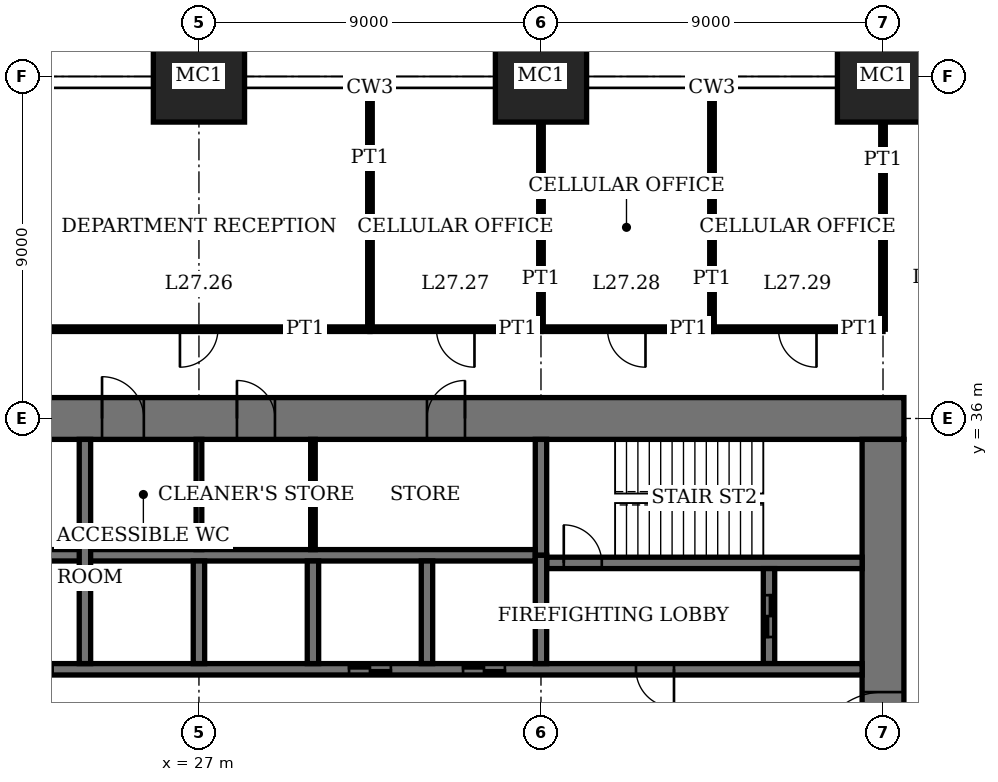
"""IFC4 building model, lengths in metres.
Left out: names, types, materials, properties, quantities, classifications, styles, units other than length and angle.
Written with IfcOpenShell. Run it as: python <this file> out.ifc"""

import sys

from ifc_helpers import new_model, si_unit, direction, frame, frame_2d, origin, origin_2d, place, context, subcontext, project, spatial, rectangle, extrude, element, fill, save


model = new_model("IFC4")
c1 = context("Model", 3, precision=1e-05, world=origin(), true_north=direction((0.0, 1.0)))
c2 = subcontext(c1, "Body", "Model", "MODEL_VIEW")
j1 = project(units=[si_unit("LENGTHUNIT", "METRE"), si_unit("PLANEANGLEUNIT", "RADIAN")], contexts=[c1])
p1 = place(None, origin())
s1 = spatial("IfcSite", under=j1, at=p1, CompositionType="ELEMENT")
p2 = place(p1, origin())
s2 = spatial("IfcBuilding", under=s1, at=p2, CompositionType="ELEMENT")
p3 = place(p2, frame((0.0, 0.0, 113.0)))
s3 = spatial("IfcBuildingStorey", under=s2, at=p3, CompositionType="ELEMENT", Elevation=113.0)
for number, where, z_axis, x_axis in (
    (1, (27.0, 45.0, 0.0), (0.0, 0.0, 1.0), (1.0, 0.0, 0.0)),
    (2, (36.0, 45.0, 0.0), (0.0, 0.0, 1.0), (1.0, 0.0, 0.0)),
    (3, (45.0, 45.0, 0.0), (0.0, 0.0, 1.0), (1.0, 0.0, 0.0)),
):
    element("IfcColumn", number, at=place(p3, frame(where, z_axis=z_axis, x_axis=x_axis)), inside=s3, PredefinedType="COLUMN", context=c2, shape_type="SweptSolid", body=[
        extrude(rectangle(XDim=2.4, YDim=2.4, at=origin_2d()), origin(), (0.0, 0.0, 1.0), 4.0),
    ])
p4 = place(p3, frame((45.55, 36.0, 0.0), z_axis=(0.0, 0.0, 1.0), x_axis=(-1.0, 0.0, 0.0)))
e4 = element("IfcWall", 4, at=p4, inside=s3, PredefinedType="SHEAR", context=c2, shape_type="SweptSolid", body=[
    extrude(rectangle(XDim=28.1, YDim=1.1, at=frame_2d((14.05, 0.0))), origin(), (0.0, 0.0, 1.0), 4.0),
])
p5 = place(p4, frame((11.55, 0.0, 0.0)))
e5 = element("IfcOpeningElement", 5, at=p5, cuts=e4, PredefinedType="OPENING", context=c2, shape_type="SweptSolid", body=[
    extrude(rectangle(XDim=1.0, YDim=2.4, at=frame_2d((0.5, 1.2))), frame((0.0, 0.56, 0.0), z_axis=(0.0, -1.0, 0.0), x_axis=(1.0, 0.0, 0.0)), (0.0, 0.0, 1.0), 1.12),
])
p6 = place(p4, frame((16.55, 0.0, 0.0)))
e6 = element("IfcOpeningElement", 6, at=p6, cuts=e4, PredefinedType="OPENING", context=c2, shape_type="SweptSolid", body=[
    extrude(rectangle(XDim=1.0, YDim=2.4, at=frame_2d((0.5, 1.2))), frame((0.0, 0.56, 0.0), z_axis=(0.0, -1.0, 0.0), x_axis=(1.0, 0.0, 0.0)), (0.0, 0.0, 1.0), 1.12),
])
p7 = place(p4, frame((20.0, 0.0, 0.0)))
e7 = element("IfcOpeningElement", 7, at=p7, cuts=e4, PredefinedType="OPENING", context=c2, shape_type="SweptSolid", body=[
    extrude(rectangle(XDim=1.1, YDim=2.4, at=frame_2d((0.55, 1.2))), frame((0.0, 0.56, 0.0), z_axis=(0.0, -1.0, 0.0), x_axis=(1.0, 0.0, 0.0)), (0.0, 0.0, 1.0), 1.12),
])
p8 = place(p4, frame((24.05, 0.0, 0.0)))
e8 = element("IfcOpeningElement", 8, at=p8, cuts=e4, PredefinedType="OPENING", context=c2, shape_type="SweptSolid", body=[
    extrude(rectangle(XDim=1.0, YDim=2.4, at=frame_2d((0.5, 1.2))), frame((0.0, 0.56, 0.0), z_axis=(0.0, -1.0, 0.0), x_axis=(1.0, 0.0, 0.0)), (0.0, 0.0, 1.0), 1.12),
])
p9 = place(p3, frame((45.0, 18.55, 0.0), z_axis=(0.0, 0.0, 1.0), x_axis=(0.0, 1.0, 0.0)))
e9 = element("IfcWall", 9, at=p9, inside=s3, PredefinedType="SHEAR", context=c2, shape_type="SweptSolid", body=[
    extrude(rectangle(XDim=16.9, YDim=1.1, at=frame_2d((8.45, 0.0))), origin(), (0.0, 0.0, 1.0), 4.0),
])
p10 = place(p9, frame((8.45, 0.0, 0.0)))
e10 = element("IfcOpeningElement", 10, at=p10, cuts=e9, PredefinedType="OPENING", context=c2, shape_type="SweptSolid", body=[
    extrude(rectangle(XDim=1.8, YDim=2.4, at=frame_2d((0.9, 1.2))), frame((0.0, 0.56, 0.0), z_axis=(0.0, -1.0, 0.0), x_axis=(1.0, 0.0, 0.0)), (0.0, 0.0, 1.0), 1.12),
])
p11 = place(p3, frame((36.15, 32.2, 0.0), z_axis=(0.0, 0.0, 1.0), x_axis=(1.0, 0.0, 0.0)))
e11 = element("IfcWall", 11, at=p11, inside=s3, PredefinedType="SHEAR", context=c2, shape_type="SweptSolid", body=[
    extrude(rectangle(XDim=8.3, YDim=0.3, at=frame_2d((4.15, 0.0))), origin(), (0.0, 0.0, 1.0), 4.0),
])
p12 = place(p11, frame((0.45, 0.0, 0.0)))
e12 = element("IfcOpeningElement", 12, at=p12, cuts=e11, PredefinedType="OPENING", context=c2, shape_type="SweptSolid", body=[
    extrude(rectangle(XDim=1.0, YDim=2.4, at=frame_2d((0.5, 1.2))), frame((0.0, 0.16, 0.0), z_axis=(0.0, -1.0, 0.0), x_axis=(1.0, 0.0, 0.0)), (0.0, 0.0, 1.0), 0.32),
])
p13 = place(p3, frame((36.0, 32.4, 0.0), z_axis=(0.0, 0.0, 1.0), x_axis=(0.0, 1.0, 0.0)))
e13 = element("IfcWall", 13, at=p13, inside=s3, PredefinedType="SHEAR", context=c2, shape_type="SweptSolid", body=[
    extrude(rectangle(XDim=3.05, YDim=0.3, at=frame_2d((1.525, 0.0))), origin(), (0.0, 0.0, 1.0), 4.0),
])
p14 = place(p3, frame((42.0, 29.55, 0.0), z_axis=(0.0, 0.0, 1.0), x_axis=(0.0, 1.0, 0.0)))
e14 = element("IfcWall", 14, at=p14, inside=s3, PredefinedType="SHEAR", context=c2, shape_type="SweptSolid", body=[
    extrude(rectangle(XDim=2.5, YDim=0.3, at=frame_2d((1.25, 0.0))), origin(), (0.0, 0.0, 1.0), 4.0),
])
p15 = place(p14, frame((0.7, 0.0, 0.0)))
e15 = element("IfcOpeningElement", 15, at=p15, cuts=e14, PredefinedType="OPENING", context=c2, shape_type="SweptSolid", body=[
    extrude(rectangle(XDim=1.1, YDim=2.4, at=frame_2d((0.55, 1.2))), frame((0.0, 0.16, 0.0), z_axis=(0.0, -1.0, 0.0), x_axis=(1.0, 0.0, 0.0)), (0.0, 0.0, 1.0), 0.32),
])
p16 = place(p3, frame((18.55, 29.4, 0.0), z_axis=(0.0, 0.0, 1.0), x_axis=(1.0, 0.0, 0.0)))
e16 = element("IfcWall", 16, at=p16, inside=s3, PredefinedType="SHEAR", context=c2, shape_type="SweptSolid", body=[
    extrude(rectangle(XDim=25.9, YDim=0.3, at=frame_2d((12.95, 0.0))), origin(), (0.0, 0.0, 1.0), 4.0),
])
p17 = place(p16, frame((19.95, 0.0, 0.0)))
e17 = element("IfcOpeningElement", 17, at=p17, cuts=e16, PredefinedType="OPENING", context=c2, shape_type="SweptSolid", body=[
    extrude(rectangle(XDim=1.0, YDim=2.4, at=frame_2d((0.5, 1.2))), frame((0.0, 0.16, 0.0), z_axis=(0.0, -1.0, 0.0), x_axis=(1.0, 0.0, 0.0)), (0.0, 0.0, 1.0), 0.32),
])
p18 = place(p16, frame((0.5, 0.0, 0.0)))
e18 = element("IfcOpeningElement", 18, at=p18, cuts=e16, PredefinedType="OPENING", context=c2, shape_type="SweptSolid", body=[
    extrude(rectangle(XDim=0.9, YDim=2.1, at=frame_2d((0.45, 1.05))), frame((0.0, 0.16, 0.0), z_axis=(0.0, -1.0, 0.0), x_axis=(1.0, 0.0, 0.0)), (0.0, 0.0, 1.0), 0.32),
])
p19 = place(p16, frame((15.4, 0.0, 0.0)))
e19 = element("IfcOpeningElement", 19, at=p19, cuts=e16, PredefinedType="OPENING", context=c2, shape_type="SweptSolid", body=[
    extrude(rectangle(XDim=1.1, YDim=2.4, at=frame_2d((0.55, 1.2))), frame((0.0, 0.16, 0.0), z_axis=(0.0, -1.0, 0.0), x_axis=(1.0, 0.0, 0.0)), (0.0, 0.0, 1.0), 0.32),
])
p20 = place(p16, frame((12.4, 0.0, 0.0)))
e20 = element("IfcOpeningElement", 20, at=p20, cuts=e16, PredefinedType="OPENING", context=c2, shape_type="SweptSolid", body=[
    extrude(rectangle(XDim=1.1, YDim=2.4, at=frame_2d((0.55, 1.2))), frame((0.0, 0.16, 0.0), z_axis=(0.0, -1.0, 0.0), x_axis=(1.0, 0.0, 0.0)), (0.0, 0.0, 1.0), 0.32),
])
p21 = place(p16, frame((3.3, 0.0, 0.0)))
e21 = element("IfcOpeningElement", 21, at=p21, cuts=e16, PredefinedType="OPENING", context=c2, shape_type="SweptSolid", body=[
    extrude(rectangle(XDim=1.3, YDim=2.4, at=frame_2d((0.65, 1.2))), frame((0.0, 0.16, 0.0), z_axis=(0.0, -1.0, 0.0), x_axis=(1.0, 0.0, 0.0)), (0.0, 0.0, 1.0), 0.32),
])
p22 = place(p3, frame((18.55, 32.4, 0.0), z_axis=(0.0, 0.0, 1.0), x_axis=(1.0, 0.0, 0.0)))
e22 = element("IfcWall", 22, at=p22, inside=s3, PredefinedType="SHEAR", context=c2, shape_type="SweptSolid", body=[
    extrude(rectangle(XDim=17.3, YDim=0.3, at=frame_2d((8.65, 0.0))), origin(), (0.0, 0.0, 1.0), 4.0),
])
for number, where, z_axis, x_axis in (
    (23, (33.0, 29.55, 0.0), (0.0, 0.0, 1.0), (0.0, 1.0, 0.0)),
    (24, (30.0, 29.55, 0.0), (0.0, 0.0, 1.0), (0.0, 1.0, 0.0)),
    (25, (27.0, 29.55, 0.0), (0.0, 0.0, 1.0), (0.0, 1.0, 0.0)),
):
    element("IfcWall", number, at=place(p3, frame(where, z_axis=z_axis, x_axis=x_axis)), inside=s3, PredefinedType="SHEAR", context=c2, shape_type="SweptSolid", body=[
        extrude(rectangle(XDim=2.7, YDim=0.3, at=frame_2d((1.35, 0.0))), origin(), (0.0, 0.0, 1.0), 4.0),
    ])
p23 = place(p3, frame((24.0, 29.55, 0.0), z_axis=(0.0, 0.0, 1.0), x_axis=(0.0, 1.0, 0.0)))
e26 = element("IfcWall", 26, at=p23, inside=s3, PredefinedType="SHEAR", context=c2, shape_type="SweptSolid", body=[
    extrude(rectangle(XDim=5.9, YDim=0.3, at=frame_2d((2.95, 0.0))), origin(), (0.0, 0.0, 1.0), 4.0),
])
p24 = place(p3, frame((36.0, 29.55, 0.0), z_axis=(0.0, 0.0, 1.0), x_axis=(0.0, 1.0, 0.0)))
e27 = element("IfcWall", 27, at=p24, inside=s3, PredefinedType="SHEAR", context=c2, shape_type="SweptSolid", body=[
    extrude(rectangle(XDim=2.85, YDim=0.3, at=frame_2d((1.425, 0.0))), origin(), (0.0, 0.0, 1.0), 4.0),
])
p25 = place(p3, frame((22.5, 38.35, 0.0), z_axis=(0.0, 0.0, 1.0), x_axis=(1.0, 0.0, 0.0)))
e28 = element("IfcWall", 28, at=p25, inside=s3, PredefinedType="PARTITIONING", context=c2, shape_type="SweptSolid", body=[
    extrude(rectangle(XDim=9.0, YDim=0.12, at=frame_2d((4.5, 0.0))), origin(), (0.0, 0.0, 1.0), 3.75),
])
p26 = place(p25, frame((4.0, 0.0, 0.0)))
e29 = element("IfcOpeningElement", 29, at=p26, cuts=e28, PredefinedType="OPENING", context=c2, shape_type="SweptSolid", body=[
    extrude(rectangle(XDim=1.0, YDim=2.4, at=frame_2d((0.5, 1.2))), frame((0.0, 0.07, 0.0), z_axis=(0.0, -1.0, 0.0), x_axis=(1.0, 0.0, 0.0)), (0.0, 0.0, 1.0), 0.14),
])
p27 = place(p3, frame((31.5, 38.35, 0.0), z_axis=(0.0, 0.0, 1.0), x_axis=(1.0, 0.0, 0.0)))
e30 = element("IfcWall", 30, at=p27, inside=s3, PredefinedType="PARTITIONING", context=c2, shape_type="SweptSolid", body=[
    extrude(rectangle(XDim=4.5, YDim=0.12, at=frame_2d((2.25, 0.0))), origin(), (0.0, 0.0, 1.0), 3.75),
])
p28 = place(p27, frame((1.75, 0.0, 0.0)))
e31 = element("IfcOpeningElement", 31, at=p28, cuts=e30, PredefinedType="OPENING", context=c2, shape_type="SweptSolid", body=[
    extrude(rectangle(XDim=1.0, YDim=2.4, at=frame_2d((0.5, 1.2))), frame((0.0, 0.07, 0.0), z_axis=(0.0, -1.0, 0.0), x_axis=(1.0, 0.0, 0.0)), (0.0, 0.0, 1.0), 0.14),
])
p29 = place(p3, frame((36.0, 38.35, 0.0), z_axis=(0.0, 0.0, 1.0), x_axis=(1.0, 0.0, 0.0)))
e32 = element("IfcWall", 32, at=p29, inside=s3, PredefinedType="PARTITIONING", context=c2, shape_type="SweptSolid", body=[
    extrude(rectangle(XDim=4.5, YDim=0.12, at=frame_2d((2.25, 0.0))), origin(), (0.0, 0.0, 1.0), 3.75),
])
p30 = place(p29, frame((1.75, 0.0, 0.0)))
e33 = element("IfcOpeningElement", 33, at=p30, cuts=e32, PredefinedType="OPENING", context=c2, shape_type="SweptSolid", body=[
    extrude(rectangle(XDim=1.0, YDim=2.4, at=frame_2d((0.5, 1.2))), frame((0.0, 0.07, 0.0), z_axis=(0.0, -1.0, 0.0), x_axis=(1.0, 0.0, 0.0)), (0.0, 0.0, 1.0), 0.14),
])
p31 = place(p3, frame((40.5, 38.35, 0.0), z_axis=(0.0, 0.0, 1.0), x_axis=(1.0, 0.0, 0.0)))
e34 = element("IfcWall", 34, at=p31, inside=s3, PredefinedType="PARTITIONING", context=c2, shape_type="SweptSolid", body=[
    extrude(rectangle(XDim=4.5, YDim=0.12, at=frame_2d((2.25, 0.0))), origin(), (0.0, 0.0, 1.0), 3.75),
])
p32 = place(p31, frame((1.75, 0.0, 0.0)))
e35 = element("IfcOpeningElement", 35, at=p32, cuts=e34, PredefinedType="OPENING", context=c2, shape_type="SweptSolid", body=[
    extrude(rectangle(XDim=1.0, YDim=2.4, at=frame_2d((0.5, 1.2))), frame((0.0, 0.07, 0.0), z_axis=(0.0, -1.0, 0.0), x_axis=(1.0, 0.0, 0.0)), (0.0, 0.0, 1.0), 0.14),
])
p33 = place(p3, frame((31.5, 38.35, 0.0), z_axis=(0.0, 0.0, 1.0), x_axis=(0.0, 1.0, 0.0)))
e36 = element("IfcWall", 36, at=p33, inside=s3, PredefinedType="PARTITIONING", context=c2, shape_type="SweptSolid", body=[
    extrude(rectangle(XDim=6.34, YDim=0.12, at=frame_2d((3.17, 0.0))), origin(), (0.0, 0.0, 1.0), 3.75),
])
p34 = place(p3, frame((36.0, 38.35, 0.0), z_axis=(0.0, 0.0, 1.0), x_axis=(0.0, 1.0, 0.0)))
e37 = element("IfcWall", 37, at=p34, inside=s3, PredefinedType="PARTITIONING", context=c2, shape_type="SweptSolid", body=[
    extrude(rectangle(XDim=5.45, YDim=0.12, at=frame_2d((2.725, 0.0))), origin(), (0.0, 0.0, 1.0), 3.05),
])
p35 = place(p3, frame((40.5, 38.35, 0.0), z_axis=(0.0, 0.0, 1.0), x_axis=(0.0, 1.0, 0.0)))
e38 = element("IfcWall", 38, at=p35, inside=s3, PredefinedType="PARTITIONING", context=c2, shape_type="SweptSolid", body=[
    extrude(rectangle(XDim=6.34, YDim=0.12, at=frame_2d((3.17, 0.0))), origin(), (0.0, 0.0, 1.0), 3.75),
])
p36 = place(p3, frame((45.0, 38.35, 0.0), z_axis=(0.0, 0.0, 1.0), x_axis=(0.0, 1.0, 0.0)))
e39 = element("IfcWall", 39, at=p36, inside=s3, PredefinedType="PARTITIONING", context=c2, shape_type="SweptSolid", body=[
    extrude(rectangle(XDim=5.45, YDim=0.12, at=frame_2d((2.725, 0.0))), origin(), (0.0, 0.0, 1.0), 3.05),
])
p37 = place(p3, frame((30.0, 32.55, 0.0), z_axis=(0.0, 0.0, 1.0), x_axis=(0.0, 1.0, 0.0)))
e40 = element("IfcWall", 40, at=p37, inside=s3, PredefinedType="PARTITIONING", context=c2, shape_type="SweptSolid", body=[
    extrude(rectangle(XDim=2.9, YDim=0.12, at=frame_2d((1.45, 0.0))), origin(), (0.0, 0.0, 1.0), 3.75),
])
p38 = place(p3, frame((27.0, 32.55, 0.0), z_axis=(0.0, 0.0, 1.0), x_axis=(0.0, 1.0, 0.0)))
e41 = element("IfcWall", 41, at=p38, inside=s3, PredefinedType="PARTITIONING", context=c2, shape_type="SweptSolid", body=[
    extrude(rectangle(XDim=2.9, YDim=0.15, at=frame_2d((1.45, 0.0))), origin(), (0.0, 0.0, 1.0), 3.75),
])
p39 = place(p10, origin())
e42 = element("IfcDoor", 42, at=p39, inside=s3, OperationType="DOUBLE_DOOR_DOUBLE_SWING", PredefinedType="DOOR", context=c2, shape_type="SweptSolid", body=[
    extrude(rectangle(XDim=1.8, YDim=2.4, at=frame_2d((0.9, 1.2))), frame((0.0, 0.03, 0.0), z_axis=(0.0, -1.0, 0.0), x_axis=(1.0, 0.0, 0.0)), (0.0, 0.0, 1.0), 0.06),
    extrude(rectangle(XDim=0.04, YDim=2.4, at=frame_2d((0.02, 1.2))), frame((0.0, 0.55, 0.0), z_axis=(0.0, -1.0, 0.0), x_axis=(1.0, 0.0, 0.0)), (0.0, 0.0, 1.0), 1.1),
    extrude(rectangle(XDim=0.04, YDim=2.4, at=frame_2d((1.78, 1.2))), frame((0.0, 0.55, 0.0), z_axis=(0.0, -1.0, 0.0), x_axis=(1.0, 0.0, 0.0)), (0.0, 0.0, 1.0), 1.1),
    extrude(rectangle(XDim=1.8, YDim=0.04, at=frame_2d((0.9, 2.38))), frame((0.0, 0.55, 0.0), z_axis=(0.0, -1.0, 0.0), x_axis=(1.0, 0.0, 0.0)), (0.0, 0.0, 1.0), 1.1),
])
fill(e10, e42)
p40 = place(p5, origin())
e43 = element("IfcDoor", 43, at=p40, inside=s3, OperationType="SINGLE_SWING_LEFT", PredefinedType="DOOR", context=c2, shape_type="SweptSolid", body=[
    extrude(rectangle(XDim=1.0, YDim=2.4, at=frame_2d((0.5, 1.2))), frame((0.0, 0.025, 0.0), z_axis=(0.0, -1.0, 0.0), x_axis=(1.0, 0.0, 0.0)), (0.0, 0.0, 1.0), 0.05),
    extrude(rectangle(XDim=0.04, YDim=2.4, at=frame_2d((0.02, 1.2))), frame((0.0, 0.4, 0.0), z_axis=(0.0, -1.0, 0.0), x_axis=(1.0, 0.0, 0.0)), (0.0, 0.0, 1.0), 0.8),
    extrude(rectangle(XDim=0.04, YDim=2.4, at=frame_2d((0.98, 1.2))), frame((0.0, 0.4, 0.0), z_axis=(0.0, -1.0, 0.0), x_axis=(1.0, 0.0, 0.0)), (0.0, 0.0, 1.0), 0.8),
    extrude(rectangle(XDim=1.0, YDim=0.04, at=frame_2d((0.5, 2.38))), frame((0.0, 0.4, 0.0), z_axis=(0.0, -1.0, 0.0), x_axis=(1.0, 0.0, 0.0)), (0.0, 0.0, 1.0), 0.8),
])
fill(e5, e43)
p41 = place(p6, origin())
e44 = element("IfcDoor", 44, at=p41, inside=s3, OperationType="SINGLE_SWING_RIGHT", PredefinedType="DOOR", context=c2, shape_type="SweptSolid", body=[
    extrude(rectangle(XDim=1.0, YDim=2.4, at=frame_2d((0.5, 1.2))), frame((0.0, 0.025, 0.0), z_axis=(0.0, -1.0, 0.0), x_axis=(1.0, 0.0, 0.0)), (0.0, 0.0, 1.0), 0.05),
    extrude(rectangle(XDim=0.04, YDim=2.4, at=frame_2d((0.02, 1.2))), frame((0.0, 0.4, 0.0), z_axis=(0.0, -1.0, 0.0), x_axis=(1.0, 0.0, 0.0)), (0.0, 0.0, 1.0), 0.8),
    extrude(rectangle(XDim=0.04, YDim=2.4, at=frame_2d((0.98, 1.2))), frame((0.0, 0.4, 0.0), z_axis=(0.0, -1.0, 0.0), x_axis=(1.0, 0.0, 0.0)), (0.0, 0.0, 1.0), 0.8),
    extrude(rectangle(XDim=1.0, YDim=0.04, at=frame_2d((0.5, 2.38))), frame((0.0, 0.4, 0.0), z_axis=(0.0, -1.0, 0.0), x_axis=(1.0, 0.0, 0.0)), (0.0, 0.0, 1.0), 0.8),
])
fill(e6, e44)
p42 = place(p7, origin())
e45 = element("IfcDoor", 45, at=p42, inside=s3, OperationType="SINGLE_SWING_RIGHT", PredefinedType="DOOR", context=c2, shape_type="SweptSolid", body=[
    extrude(rectangle(XDim=1.1, YDim=2.4, at=frame_2d((0.55, 1.2))), frame((0.0, 0.025, 0.0), z_axis=(0.0, -1.0, 0.0), x_axis=(1.0, 0.0, 0.0)), (0.0, 0.0, 1.0), 0.05),
    extrude(rectangle(XDim=0.04, YDim=2.4, at=frame_2d((0.02, 1.2))), frame((0.0, 0.44, 0.0), z_axis=(0.0, -1.0, 0.0), x_axis=(1.0, 0.0, 0.0)), (0.0, 0.0, 1.0), 0.88),
    extrude(rectangle(XDim=0.04, YDim=2.4, at=frame_2d((1.08, 1.2))), frame((0.0, 0.44, 0.0), z_axis=(0.0, -1.0, 0.0), x_axis=(1.0, 0.0, 0.0)), (0.0, 0.0, 1.0), 0.88),
    extrude(rectangle(XDim=1.1, YDim=0.04, at=frame_2d((0.55, 2.38))), frame((0.0, 0.44, 0.0), z_axis=(0.0, -1.0, 0.0), x_axis=(1.0, 0.0, 0.0)), (0.0, 0.0, 1.0), 0.88),
])
fill(e7, e45)
p43 = place(p12, origin())
e46 = element("IfcDoor", 46, at=p43, inside=s3, OperationType="SINGLE_SWING_RIGHT", PredefinedType="DOOR", context=c2, shape_type="SweptSolid", body=[
    extrude(rectangle(XDim=1.0, YDim=2.4, at=frame_2d((0.5, 1.2))), frame((0.0, 0.03, 0.0), z_axis=(0.0, -1.0, 0.0), x_axis=(1.0, 0.0, 0.0)), (0.0, 0.0, 1.0), 0.06),
])
fill(e12, e46)
p44 = place(p17, origin())
e47 = element("IfcDoor", 47, at=p44, inside=s3, OperationType="SINGLE_SWING_RIGHT", PredefinedType="DOOR", context=c2, shape_type="SweptSolid", body=[
    extrude(rectangle(XDim=1.0, YDim=2.4, at=frame_2d((0.5, 1.2))), frame((0.0, 0.03, 0.0), z_axis=(0.0, -1.0, 0.0), x_axis=(1.0, 0.0, 0.0)), (0.0, 0.0, 1.0), 0.06),
])
fill(e17, e47)
p45 = place(p26, origin())
e48 = element("IfcDoor", 48, at=p45, inside=s3, OperationType="SINGLE_SWING_LEFT", PredefinedType="DOOR", context=c2, shape_type="SweptSolid", body=[
    extrude(rectangle(XDim=1.0, YDim=2.4, at=frame_2d((0.5, 1.2))), frame((0.0, 0.025, 0.0), z_axis=(0.0, -1.0, 0.0), x_axis=(1.0, 0.0, 0.0)), (0.0, 0.0, 1.0), 0.05),
])
fill(e29, e48)
p46 = place(p28, origin())
e49 = element("IfcDoor", 49, at=p46, inside=s3, OperationType="SINGLE_SWING_RIGHT", PredefinedType="DOOR", context=c2, shape_type="SweptSolid", body=[
    extrude(rectangle(XDim=1.0, YDim=2.4, at=frame_2d((0.5, 1.2))), frame((0.0, 0.025, 0.0), z_axis=(0.0, -1.0, 0.0), x_axis=(1.0, 0.0, 0.0)), (0.0, 0.0, 1.0), 0.05),
])
fill(e31, e49)
p47 = place(p30, origin())
e50 = element("IfcDoor", 50, at=p47, inside=s3, OperationType="SINGLE_SWING_RIGHT", PredefinedType="DOOR", context=c2, shape_type="SweptSolid", body=[
    extrude(rectangle(XDim=1.0, YDim=2.4, at=frame_2d((0.5, 1.2))), frame((0.0, 0.025, 0.0), z_axis=(0.0, -1.0, 0.0), x_axis=(1.0, 0.0, 0.0)), (0.0, 0.0, 1.0), 0.05),
])
fill(e33, e50)
p48 = place(p32, origin())
e51 = element("IfcDoor", 51, at=p48, inside=s3, OperationType="SINGLE_SWING_RIGHT", PredefinedType="DOOR", context=c2, shape_type="SweptSolid", body=[
    extrude(rectangle(XDim=1.0, YDim=2.4, at=frame_2d((0.5, 1.2))), frame((0.0, 0.025, 0.0), z_axis=(0.0, -1.0, 0.0), x_axis=(1.0, 0.0, 0.0)), (0.0, 0.0, 1.0), 0.05),
])
fill(e35, e51)
p49 = place(p19, origin())
e52 = element("IfcDoor", 52, at=p49, inside=s3, OperationType="DOUBLE_DOOR_SLIDING", PredefinedType="DOOR", context=c2, shape_type="SweptSolid", body=[
    extrude(rectangle(XDim=1.1, YDim=2.4, at=frame_2d((0.55, 1.2))), frame((0.0, 0.02, 0.0), z_axis=(0.0, -1.0, 0.0), x_axis=(1.0, 0.0, 0.0)), (0.0, 0.0, 1.0), 0.04),
])
fill(e19, e52)
p50 = place(p20, origin())
e53 = element("IfcDoor", 53, at=p50, inside=s3, OperationType="DOUBLE_DOOR_SLIDING", PredefinedType="DOOR", context=c2, shape_type="SweptSolid", body=[
    extrude(rectangle(XDim=1.1, YDim=2.4, at=frame_2d((0.55, 1.2))), frame((0.0, 0.02, 0.0), z_axis=(0.0, -1.0, 0.0), x_axis=(1.0, 0.0, 0.0)), (0.0, 0.0, 1.0), 0.04),
])
fill(e20, e53)
p51 = place(p21, origin())
e54 = element("IfcDoor", 54, at=p51, inside=s3, OperationType="DOUBLE_DOOR_SLIDING", PredefinedType="DOOR", context=c2, shape_type="SweptSolid", body=[
    extrude(rectangle(XDim=1.3, YDim=2.4, at=frame_2d((0.65, 1.2))), frame((0.0, 0.02, 0.0), z_axis=(0.0, -1.0, 0.0), x_axis=(1.0, 0.0, 0.0)), (0.0, 0.0, 1.0), 0.04),
])
fill(e21, e54)
p52 = place(p15, origin())
e55 = element("IfcDoor", 55, at=p52, inside=s3, OperationType="DOUBLE_DOOR_SLIDING", PredefinedType="DOOR", context=c2, shape_type="SweptSolid", body=[
    extrude(rectangle(XDim=1.1, YDim=2.4, at=frame_2d((0.55, 1.2))), frame((0.0, 0.03, 0.0), z_axis=(0.0, -1.0, 0.0), x_axis=(1.0, 0.0, 0.0)), (0.0, 0.0, 1.0), 0.06),
])
fill(e15, e55)
save(model, sys.argv[1])
